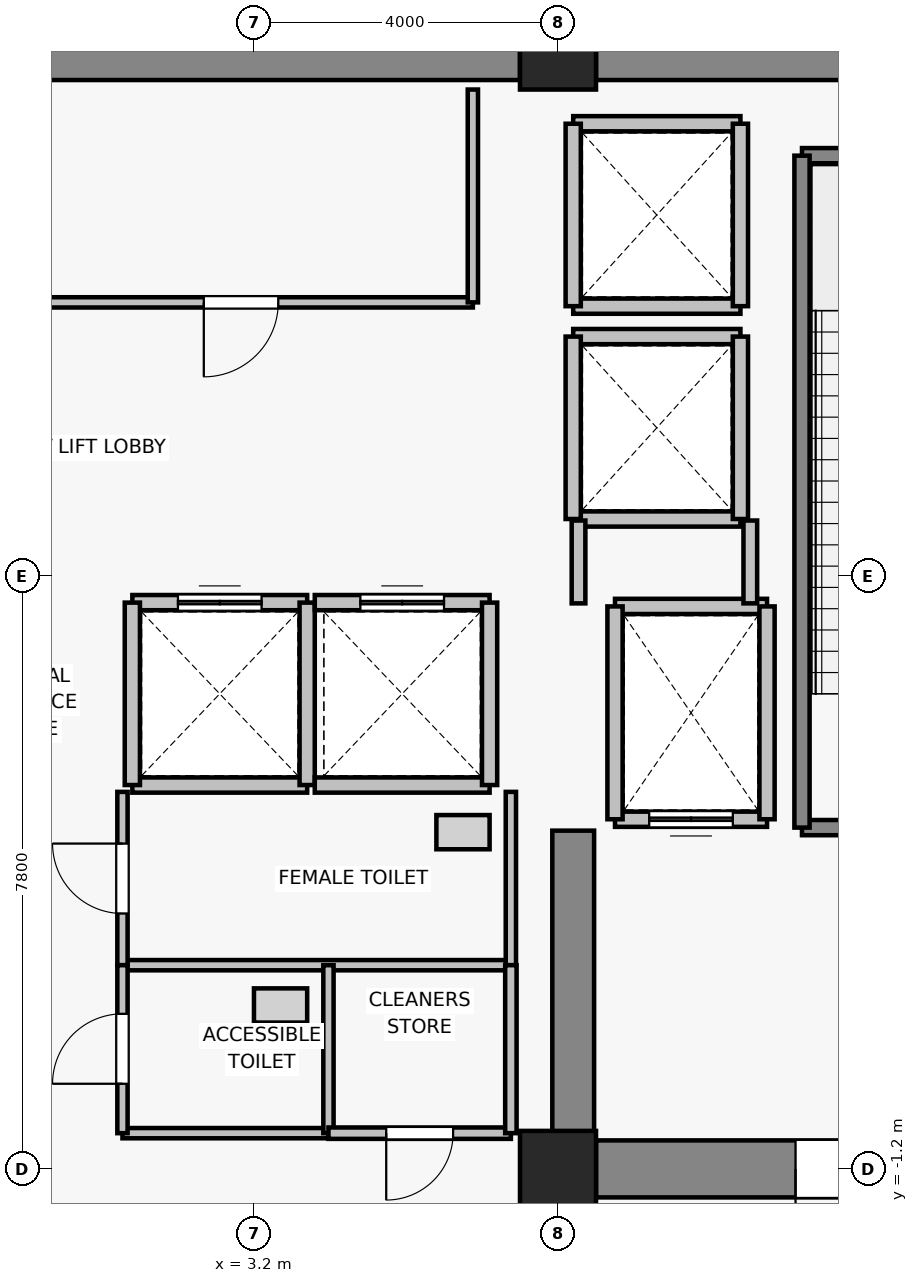
"""IFC4 building model, lengths in metres.
Left out: names, types, materials, properties, quantities, classifications, styles, units other than length and angle.
Written with IfcOpenShell. Run it as: python <this file> out.ifc"""

import sys

from ifc_helpers import new_model, si_unit, direction, frame, frame_2d, origin, origin_2d, place, context, subcontext, project, spatial, rectangle, extrude, source, transform, mapped, element, fill, save


model = new_model("IFC4")
c1 = context("Model", 3, precision=1e-05, world=origin(), true_north=direction((0.0, 1.0)))
c2 = subcontext(c1, "Body", "Model", "MODEL_VIEW")
j1 = project(units=[si_unit("LENGTHUNIT", "METRE"), si_unit("PLANEANGLEUNIT", "RADIAN")], contexts=[c1])
p1 = place(None, origin())
s1 = spatial("IfcSite", under=j1, at=p1, CompositionType="ELEMENT")
p2 = place(p1, origin())
s2 = spatial("IfcBuilding", under=s1, at=p2, CompositionType="ELEMENT")
p3 = place(p2, frame((0.0, 0.0, 139.6)))
s3 = spatial("IfcBuildingStorey", under=s2, at=p3, CompositionType="ELEMENT", Elevation=139.6)
for number, where, z_axis, x_axis in (
    (1, (7.2, -1.2, 0.0), (0.0, 0.0, 1.0), (1.0, 0.0, 0.0)),
    (2, (7.2, 13.5, 0.0), (0.0, 0.0, 1.0), (1.0, 0.0, 0.0)),
):
    element("IfcColumn", number, at=place(p3, frame(where, z_axis=z_axis, x_axis=x_axis)), inside=s3, PredefinedType="COLUMN", context=c2, shape_type="SweptSolid", body=[
        extrude(rectangle(XDim=1.0, YDim=1.0, at=origin_2d()), origin(), (0.0, 0.0, 1.0), 6.6),
    ])
p4 = place(p3, frame((-6.7, 13.5, 0.0), z_axis=(0.0, 0.0, 1.0), x_axis=(1.0, 0.0, 0.0)))
e3 = element("IfcWall", 3, at=p4, inside=s3, PredefinedType="SHEAR", context=c2, shape_type="SweptSolid", body=[
    extrude(rectangle(XDim=13.4, YDim=0.75, at=frame_2d((6.7, 0.0))), origin(), (0.0, 0.0, 1.0), 6.375),
])
p5 = place(p3, frame((7.7, 13.5, 0.0), z_axis=(0.0, 0.0, 1.0), x_axis=(1.0, 0.0, 0.0)))
e4 = element("IfcWall", 4, at=p5, inside=s3, PredefinedType="SHEAR", context=c2, shape_type="SweptSolid", body=[
    extrude(rectangle(XDim=6.2, YDim=0.75, at=frame_2d((3.1, 0.0))), origin(), (0.0, 0.0, 1.0), 6.375),
])
p6 = place(p3, frame((13.9, -1.2, 0.0), z_axis=(0.0, 0.0, 1.0), x_axis=(-1.0, 0.0, 0.0)))
e5 = element("IfcWall", 5, at=p6, inside=s3, PredefinedType="SHEAR", context=c2, shape_type="SweptSolid", body=[
    extrude(rectangle(XDim=6.2, YDim=0.75, at=frame_2d((3.1, 0.0))), origin(), (0.0, 0.0, 1.0), 6.375),
])
p7 = place(p6, frame((2.425, 0.0, 0.0)))
e6 = element("IfcOpeningElement", 6, at=p7, cuts=e5, PredefinedType="OPENING", context=c2, shape_type="SweptSolid", body=[
    extrude(rectangle(XDim=1.15, YDim=2.15, at=frame_2d((0.575, 1.075))), frame((0.0, 0.385, 0.0), z_axis=(0.0, -1.0, 0.0), x_axis=(1.0, 0.0, 0.0)), (0.0, 0.0, 1.0), 0.77),
])
p8 = place(p3, frame((7.4, -0.825, 0.0), z_axis=(0.0, 0.0, 1.0), x_axis=(0.0, 1.0, 0.0)))
e7 = element("IfcWall", 7, at=p8, inside=s3, PredefinedType="SHEAR", context=c2, shape_type="SweptSolid", body=[
    extrude(rectangle(XDim=4.075, YDim=0.55, at=frame_2d((2.038, 0.0))), origin(), (0.0, 0.0, 1.0), 6.375),
])
p9 = place(p3, frame((9.95, 3.4, 0.0), z_axis=(0.0, 0.0, 1.0), x_axis=(-1.0, 0.0, 0.0)))
e8 = element("IfcWall", 8, at=p9, inside=s3, PredefinedType="SOLIDWALL", context=c2, shape_type="SweptSolid", body=[
    extrude(rectangle(XDim=2.0, YDim=0.2, at=frame_2d((1.0, 0.0))), origin(), (0.0, 0.0, 1.0), 6.375),
])
p10 = place(p9, frame((0.45, 0.0, 0.0)))
e9 = element("IfcOpeningElement", 9, at=p10, cuts=e8, PredefinedType="OPENING", context=c2, shape_type="SweptSolid", body=[
    extrude(rectangle(XDim=1.1, YDim=2.2, at=frame_2d((0.55, 1.1))), frame((0.0, 0.11, 0.0), z_axis=(0.0, -1.0, 0.0), x_axis=(1.0, 0.0, 0.0)), (0.0, 0.0, 1.0), 0.22),
])
p11 = place(p3, frame((7.95, 6.2, 0.0), z_axis=(0.0, 0.0, 1.0), x_axis=(1.0, 0.0, 0.0)))
e10 = element("IfcWall", 10, at=p11, inside=s3, PredefinedType="SOLIDWALL", context=c2, shape_type="SweptSolid", body=[
    extrude(rectangle(XDim=2.0, YDim=0.2, at=frame_2d((1.0, 0.0))), origin(), (0.0, 0.0, 1.0), 6.375),
])
for number, where, z_axis, x_axis in (
    (11, (7.95, 3.4, 0.0), (0.0, 0.0, 1.0), (0.0, 1.0, 0.0)),
    (12, (9.95, 6.2, 0.0), (0.0, 0.0, 1.0), (0.0, -1.0, 0.0)),
):
    element("IfcWall", number, at=place(p3, frame(where, z_axis=z_axis, x_axis=x_axis)), inside=s3, PredefinedType="SOLIDWALL", context=c2, shape_type="SweptSolid", body=[
        extrude(rectangle(XDim=2.8, YDim=0.2, at=frame_2d((1.4, 0.0))), origin(), (0.0, 0.0, 1.0), 6.375),
    ])
p12 = place(p3, frame((3.9, 3.85, 0.0), z_axis=(0.0, 0.0, 1.0), x_axis=(-1.0, 0.0, 0.0)))
e13 = element("IfcWall", 13, at=p12, inside=s3, PredefinedType="SOLIDWALL", context=c2, shape_type="SweptSolid", body=[
    extrude(rectangle(XDim=2.3, YDim=0.2, at=frame_2d((1.15, 0.0))), origin(), (0.0, 0.0, 1.0), 6.375),
])
p13 = place(p3, frame((1.6, 6.25, 0.0), z_axis=(0.0, 0.0, 1.0), x_axis=(1.0, 0.0, 0.0)))
e14 = element("IfcWall", 14, at=p13, inside=s3, PredefinedType="SOLIDWALL", context=c2, shape_type="SweptSolid", body=[
    extrude(rectangle(XDim=2.3, YDim=0.2, at=frame_2d((1.15, 0.0))), origin(), (0.0, 0.0, 1.0), 6.375),
])
p14 = place(p13, frame((0.6, 0.0, 0.0)))
e15 = element("IfcOpeningElement", 15, at=p14, cuts=e14, PredefinedType="OPENING", context=c2, shape_type="SweptSolid", body=[
    extrude(rectangle(XDim=1.1, YDim=2.2, at=frame_2d((0.55, 1.1))), frame((0.0, 0.11, 0.0), z_axis=(0.0, -1.0, 0.0), x_axis=(1.0, 0.0, 0.0)), (0.0, 0.0, 1.0), 0.22),
])
for number, where, z_axis, x_axis in (
    (16, (1.6, 3.85, 0.0), (0.0, 0.0, 1.0), (0.0, 1.0, 0.0)),
    (17, (3.9, 6.25, 0.0), (0.0, 0.0, 1.0), (0.0, -1.0, 0.0)),
):
    element("IfcWall", number, at=place(p3, frame(where, z_axis=z_axis, x_axis=x_axis)), inside=s3, PredefinedType="SOLIDWALL", context=c2, shape_type="SweptSolid", body=[
        extrude(rectangle(XDim=2.4, YDim=0.2, at=frame_2d((1.2, 0.0))), origin(), (0.0, 0.0, 1.0), 6.375),
    ])
p15 = place(p3, frame((6.3, 3.85, 0.0), z_axis=(0.0, 0.0, 1.0), x_axis=(-1.0, 0.0, 0.0)))
e18 = element("IfcWall", 18, at=p15, inside=s3, PredefinedType="SOLIDWALL", context=c2, shape_type="SweptSolid", body=[
    extrude(rectangle(XDim=2.3, YDim=0.2, at=frame_2d((1.15, 0.0))), origin(), (0.0, 0.0, 1.0), 6.375),
])
p16 = place(p3, frame((4.0, 6.25, 0.0), z_axis=(0.0, 0.0, 1.0), x_axis=(1.0, 0.0, 0.0)))
e19 = element("IfcWall", 19, at=p16, inside=s3, PredefinedType="SOLIDWALL", context=c2, shape_type="SweptSolid", body=[
    extrude(rectangle(XDim=2.3, YDim=0.2, at=frame_2d((1.15, 0.0))), origin(), (0.0, 0.0, 1.0), 6.375),
])
p17 = place(p16, frame((0.6, 0.0, 0.0)))
e20 = element("IfcOpeningElement", 20, at=p17, cuts=e19, PredefinedType="OPENING", context=c2, shape_type="SweptSolid", body=[
    extrude(rectangle(XDim=1.1, YDim=2.2, at=frame_2d((0.55, 1.1))), frame((0.0, 0.11, 0.0), z_axis=(0.0, -1.0, 0.0), x_axis=(1.0, 0.0, 0.0)), (0.0, 0.0, 1.0), 0.22),
])
p18 = place(p3, frame((6.3, 6.25, 0.0), z_axis=(0.0, 0.0, 1.0), x_axis=(0.0, -1.0, 0.0)))
e21 = element("IfcWall", 21, at=p18, inside=s3, PredefinedType="SOLIDWALL", context=c2, shape_type="SweptSolid", body=[
    extrude(rectangle(XDim=2.4, YDim=0.2, at=frame_2d((1.2, 0.0))), origin(), (0.0, 0.0, 1.0), 6.375),
])
for number, where, z_axis, x_axis in (
    (22, (9.6, 7.35, 0.0), (0.0, 0.0, 1.0), (-1.0, 0.0, 0.0)),
    (23, (7.4, 9.75, 0.0), (0.0, 0.0, 1.0), (1.0, 0.0, 0.0)),
):
    element("IfcWall", number, at=place(p3, frame(where, z_axis=z_axis, x_axis=x_axis)), inside=s3, PredefinedType="SOLIDWALL", context=c2, shape_type="SweptSolid", body=[
        extrude(rectangle(XDim=2.2, YDim=0.2, at=frame_2d((1.1, 0.0))), origin(), (0.0, 0.0, 1.0), 5.865),
    ])
p19 = place(p3, frame((7.4, 7.35, 0.0), z_axis=(0.0, 0.0, 1.0), x_axis=(0.0, 1.0, 0.0)))
e24 = element("IfcWall", 24, at=p19, inside=s3, PredefinedType="SOLIDWALL", context=c2, shape_type="SweptSolid", body=[
    extrude(rectangle(XDim=2.4, YDim=0.2, at=frame_2d((1.2, 0.0))), origin(), (0.0, 0.0, 1.0), 5.865),
])
p20 = place(p3, frame((9.6, 9.75, 0.0), z_axis=(0.0, 0.0, 1.0), x_axis=(0.0, -1.0, 0.0)))
e25 = element("IfcWall", 25, at=p20, inside=s3, PredefinedType="SOLIDWALL", context=c2, shape_type="SweptSolid", body=[
    extrude(rectangle(XDim=2.4, YDim=0.2, at=frame_2d((1.2, 0.0))), origin(), (0.0, 0.0, 1.0), 6.375),
])
for number, where, z_axis, x_axis in (
    (26, (9.6, 10.15, 0.0), (0.0, 0.0, 1.0), (-1.0, 0.0, 0.0)),
    (27, (7.4, 12.55, 0.0), (0.0, 0.0, 1.0), (1.0, 0.0, 0.0)),
):
    element("IfcWall", number, at=place(p3, frame(where, z_axis=z_axis, x_axis=x_axis)), inside=s3, PredefinedType="SOLIDWALL", context=c2, shape_type="SweptSolid", body=[
        extrude(rectangle(XDim=2.2, YDim=0.2, at=frame_2d((1.1, 0.0))), origin(), (0.0, 0.0, 1.0), 5.865),
    ])
p21 = place(p3, frame((7.4, 10.15, 0.0), z_axis=(0.0, 0.0, 1.0), x_axis=(0.0, 1.0, 0.0)))
e28 = element("IfcWall", 28, at=p21, inside=s3, PredefinedType="SOLIDWALL", context=c2, shape_type="SweptSolid", body=[
    extrude(rectangle(XDim=2.4, YDim=0.2, at=frame_2d((1.2, 0.0))), origin(), (0.0, 0.0, 1.0), 5.865),
])
p22 = place(p3, frame((9.6, 12.55, 0.0), z_axis=(0.0, 0.0, 1.0), x_axis=(0.0, -1.0, 0.0)))
e29 = element("IfcWall", 29, at=p22, inside=s3, PredefinedType="SOLIDWALL", context=c2, shape_type="SweptSolid", body=[
    extrude(rectangle(XDim=2.4, YDim=0.2, at=frame_2d((1.2, 0.0))), origin(), (0.0, 0.0, 1.0), 6.375),
])
p23 = place(p3, frame((13.93, 3.29, 0.0), z_axis=(0.0, 0.0, 1.0), x_axis=(-1.0, 0.0, 0.0)))
e30 = element("IfcWall", 30, at=p23, inside=s3, PredefinedType="SOLIDWALL", context=c2, shape_type="SweptSolid", body=[
    extrude(rectangle(XDim=3.52, YDim=0.2, at=frame_2d((1.76, 0.0))), origin(), (0.0, 0.0, 1.0), 6.375),
])
p24 = place(p23, frame((1.205, 0.0, 0.0)))
e31 = element("IfcOpeningElement", 31, at=p24, cuts=e30, PredefinedType="OPENING", context=c2, shape_type="SweptSolid", body=[
    extrude(rectangle(XDim=1.15, YDim=2.15, at=frame_2d((0.575, 1.075))), frame((0.0, 0.11, 0.0), z_axis=(0.0, -1.0, 0.0), x_axis=(1.0, 0.0, 0.0)), (0.0, 0.0, 1.0), 0.22),
])
p25 = place(p3, frame((10.41, 12.13, 0.0), z_axis=(0.0, 0.0, 1.0), x_axis=(1.0, 0.0, 0.0)))
e32 = element("IfcWall", 32, at=p25, inside=s3, PredefinedType="SOLIDWALL", context=c2, shape_type="SweptSolid", body=[
    extrude(rectangle(XDim=3.52, YDim=0.2, at=frame_2d((1.76, 0.0))), origin(), (0.0, 0.0, 1.0), 6.375),
])
p26 = place(p3, frame((10.41, 3.29, 0.0), z_axis=(0.0, 0.0, 1.0), x_axis=(0.0, 1.0, 0.0)))
e33 = element("IfcWall", 33, at=p26, inside=s3, PredefinedType="SOLIDWALL", context=c2, shape_type="SweptSolid", body=[
    extrude(rectangle(XDim=8.84, YDim=0.2, at=frame_2d((4.42, 0.0))), origin(), (0.0, 0.0, 1.0), 6.375),
])
p27 = place(p3, frame((7.47, 6.24, 0.0), z_axis=(0.0, 0.0, 1.0), x_axis=(0.0, 1.0, 0.0)))
e34 = element("IfcWall", 34, at=p27, inside=s3, PredefinedType="PARTITIONING", context=c2, shape_type="SweptSolid", body=[
    extrude(rectangle(XDim=1.09, YDim=0.18, at=frame_2d((0.545, 0.0))), origin(), (0.0, 0.0, 1.0), 5.865),
])
p28 = place(p3, frame((9.73, 7.33, 0.0), z_axis=(0.0, 0.0, 1.0), x_axis=(0.0, -1.0, 0.0)))
e35 = element("IfcWall", 35, at=p28, inside=s3, PredefinedType="PARTITIONING", context=c2, shape_type="SweptSolid", body=[
    extrude(rectangle(XDim=1.09, YDim=0.18, at=frame_2d((0.545, 0.0))), origin(), (0.0, 0.0, 1.0), 6.375),
])
p29 = place(p3, frame((6.08, 10.2, 0.0), z_axis=(0.0, 0.0, 1.0), x_axis=(-1.0, 0.0, 0.0)))
e36 = element("IfcWall", 36, at=p29, inside=s3, PredefinedType="PARTITIONING", context=c2, shape_type="SweptSolid", body=[
    extrude(rectangle(XDim=6.1, YDim=0.135, at=frame_2d((3.05, 0.0))), origin(), (0.0, 0.0, 1.0), 6.375),
])
p30 = place(p29, frame((2.56, 0.0, 0.0)))
e37 = element("IfcOpeningElement", 37, at=p30, cuts=e36, PredefinedType="OPENING", context=c2, shape_type="SweptSolid", body=[
    extrude(rectangle(XDim=0.98, YDim=2.15, at=frame_2d((0.49, 1.075))), frame((0.0, 0.077, 0.0), z_axis=(0.0, -1.0, 0.0), x_axis=(1.0, 0.0, 0.0)), (0.0, 0.0, 1.0), 0.155),
])
p31 = place(p3, frame((6.08, 13.0, 0.0), z_axis=(0.0, 0.0, 1.0), x_axis=(0.0, -1.0, 0.0)))
e38 = element("IfcWall", 38, at=p31, inside=s3, PredefinedType="PARTITIONING", context=c2, shape_type="SweptSolid", body=[
    extrude(rectangle(XDim=2.8, YDim=0.135, at=frame_2d((1.4, 0.0))), origin(), (0.0, 0.0, 1.0), 6.375),
])
p32 = place(p3, frame((6.58, 1.48, 0.0), z_axis=(0.0, 0.0, 1.0), x_axis=(-1.0, 0.0, 0.0)))
e39 = element("IfcWall", 39, at=p32, inside=s3, PredefinedType="PARTITIONING", context=c2, shape_type="SweptSolid", body=[
    extrude(rectangle(XDim=5.11, YDim=0.135, at=frame_2d((2.555, 0.0))), origin(), (0.0, 0.0, 1.0), 6.375),
])
p33 = place(p3, frame((1.47, 1.48, 0.0), z_axis=(0.0, 0.0, 1.0), x_axis=(0.0, 1.0, 0.0)))
e40 = element("IfcWall", 40, at=p33, inside=s3, PredefinedType="PARTITIONING", context=c2, shape_type="SweptSolid", body=[
    extrude(rectangle(XDim=2.28, YDim=0.135, at=frame_2d((1.14, 0.0))), origin(), (0.0, 0.0, 1.0), 6.375),
])
p34 = place(p33, frame((0.68, 0.0, 0.0)))
e41 = element("IfcOpeningElement", 41, at=p34, cuts=e40, PredefinedType="OPENING", context=c2, shape_type="SweptSolid", body=[
    extrude(rectangle(XDim=0.92, YDim=2.1, at=frame_2d((0.46, 1.05))), frame((0.0, 0.077, 0.0), z_axis=(0.0, -1.0, 0.0), x_axis=(1.0, 0.0, 0.0)), (0.0, 0.0, 1.0), 0.155),
])
p35 = place(p3, frame((6.58, 3.76, 0.0), z_axis=(0.0, 0.0, 1.0), x_axis=(0.0, -1.0, 0.0)))
e42 = element("IfcWall", 42, at=p35, inside=s3, PredefinedType="PARTITIONING", context=c2, shape_type="SweptSolid", body=[
    extrude(rectangle(XDim=2.28, YDim=0.135, at=frame_2d((1.14, 0.0))), origin(), (0.0, 0.0, 1.0), 6.375),
])
p36 = place(p3, frame((4.18, -0.73, 0.0), z_axis=(0.0, 0.0, 1.0), x_axis=(-1.0, 0.0, 0.0)))
e43 = element("IfcWall", 43, at=p36, inside=s3, PredefinedType="PARTITIONING", context=c2, shape_type="SweptSolid", body=[
    extrude(rectangle(XDim=2.71, YDim=0.135, at=frame_2d((1.355, 0.0))), origin(), (0.0, 0.0, 1.0), 6.375),
])
p37 = place(p3, frame((1.47, -0.73, 0.0), z_axis=(0.0, 0.0, 1.0), x_axis=(0.0, 1.0, 0.0)))
e44 = element("IfcWall", 44, at=p37, inside=s3, PredefinedType="PARTITIONING", context=c2, shape_type="SweptSolid", body=[
    extrude(rectangle(XDim=2.21, YDim=0.135, at=frame_2d((1.105, 0.0))), origin(), (0.0, 0.0, 1.0), 6.375),
])
p38 = place(p37, frame((0.65, 0.0, 0.0)))
e45 = element("IfcOpeningElement", 45, at=p38, cuts=e44, PredefinedType="OPENING", context=c2, shape_type="SweptSolid", body=[
    extrude(rectangle(XDim=0.92, YDim=2.1, at=frame_2d((0.46, 1.05))), frame((0.0, 0.077, 0.0), z_axis=(0.0, -1.0, 0.0), x_axis=(1.0, 0.0, 0.0)), (0.0, 0.0, 1.0), 0.155),
])
p39 = place(p3, frame((4.18, 1.48, 0.0), z_axis=(0.0, 0.0, 1.0), x_axis=(0.0, -1.0, 0.0)))
e46 = element("IfcWall", 46, at=p39, inside=s3, PredefinedType="PARTITIONING", context=c2, shape_type="SweptSolid", body=[
    extrude(rectangle(XDim=2.21, YDim=0.135, at=frame_2d((1.105, 0.0))), origin(), (0.0, 0.0, 1.0), 6.375),
])
p40 = place(p3, frame((6.58, -0.73, 0.0), z_axis=(0.0, 0.0, 1.0), x_axis=(-1.0, 0.0, 0.0)))
e47 = element("IfcWall", 47, at=p40, inside=s3, PredefinedType="PARTITIONING", context=c2, shape_type="SweptSolid", body=[
    extrude(rectangle(XDim=2.4, YDim=0.15, at=frame_2d((1.2, 0.0))), origin(), (0.0, 0.0, 1.0), 6.375),
])
p41 = place(p40, frame((0.76, 0.0, 0.0)))
e48 = element("IfcOpeningElement", 48, at=p41, cuts=e47, PredefinedType="OPENING", context=c2, shape_type="SweptSolid", body=[
    extrude(rectangle(XDim=0.88, YDim=2.1, at=frame_2d((0.44, 1.05))), frame((0.0, 0.085, 0.0), z_axis=(0.0, -1.0, 0.0), x_axis=(1.0, 0.0, 0.0)), (0.0, 0.0, 1.0), 0.17),
])
p42 = place(p3, frame((6.58, 1.48, 0.0), z_axis=(0.0, 0.0, 1.0), x_axis=(0.0, -1.0, 0.0)))
e49 = element("IfcWall", 49, at=p42, inside=s3, PredefinedType="PARTITIONING", context=c2, shape_type="SweptSolid", body=[
    extrude(rectangle(XDim=2.21, YDim=0.15, at=frame_2d((1.105, 0.0))), origin(), (0.0, 0.0, 1.0), 6.375),
])
m1 = source(origin(), c2, "Body", "SweptSolid", [
    extrude(rectangle(XDim=1.1, YDim=2.2, at=frame_2d((0.55, 1.1))), frame((0.0, 0.025, 0.0), z_axis=(0.0, -1.0, 0.0), x_axis=(1.0, 0.0, 0.0)), (0.0, 0.0, 1.0), 0.05),
])
p43 = place(p10, origin())
e50 = element("IfcDoor", 50, at=p43, inside=s3, OperationType="DOUBLE_DOOR_SLIDING", PredefinedType="DOOR", context=c2, shape_type="MappedRepresentation", body=[
    mapped(m1, transform((0.0, 0.0, 0.0), x_axis=(1.0, 0.0, 0.0), y_axis=(0.0, 1.0, 0.0), z_axis=(0.0, 0.0, 1.0), scale=1.0)),
])
fill(e9, e50)
p44 = place(p14, origin())
e51 = element("IfcDoor", 51, at=p44, inside=s3, OperationType="DOUBLE_DOOR_SLIDING", PredefinedType="DOOR", context=c2, shape_type="MappedRepresentation", body=[
    mapped(m1, transform((0.0, 0.0, 0.0), x_axis=(1.0, 0.0, 0.0), y_axis=(0.0, 1.0, 0.0), z_axis=(0.0, 0.0, 1.0), scale=1.0)),
])
fill(e15, e51)
p45 = place(p17, origin())
e52 = element("IfcDoor", 52, at=p45, inside=s3, OperationType="DOUBLE_DOOR_SLIDING", PredefinedType="DOOR", context=c2, shape_type="MappedRepresentation", body=[
    mapped(m1, transform((0.0, 0.0, 0.0), x_axis=(1.0, 0.0, 0.0), y_axis=(0.0, 1.0, 0.0), z_axis=(0.0, 0.0, 1.0), scale=1.0)),
])
fill(e20, e52)
m2 = source(origin(), c2, "Body", "SweptSolid", [
    extrude(rectangle(XDim=1.15, YDim=2.15, at=frame_2d((0.575, 1.075))), frame((0.0, 0.025, 0.0), z_axis=(0.0, -1.0, 0.0), x_axis=(1.0, 0.0, 0.0)), (0.0, 0.0, 1.0), 0.05),
])
p46 = place(p7, origin())
e53 = element("IfcDoor", 53, at=p46, inside=s3, OperationType="SINGLE_SWING_RIGHT", PredefinedType="DOOR", context=c2, shape_type="MappedRepresentation", body=[
    mapped(m2, transform((0.0, 0.0, 0.0), x_axis=(1.0, 0.0, 0.0), y_axis=(0.0, 1.0, 0.0), z_axis=(0.0, 0.0, 1.0), scale=1.0)),
])
fill(e6, e53)
m3 = source(origin(), c2, "Body", "SweptSolid", [
    extrude(rectangle(XDim=0.98, YDim=2.15, at=frame_2d((0.49, 1.075))), frame((0.0, 0.025, 0.0), z_axis=(0.0, -1.0, 0.0), x_axis=(1.0, 0.0, 0.0)), (0.0, 0.0, 1.0), 0.05),
])
p47 = place(p30, origin())
e54 = element("IfcDoor", 54, at=p47, inside=s3, OperationType="SINGLE_SWING_RIGHT", PredefinedType="DOOR", context=c2, shape_type="MappedRepresentation", body=[
    mapped(m3, transform((0.0, 0.0, 0.0), x_axis=(1.0, 0.0, 0.0), y_axis=(0.0, 1.0, 0.0), z_axis=(0.0, 0.0, 1.0), scale=1.0)),
])
fill(e37, e54)
m4 = source(origin(), c2, "Body", "SweptSolid", [
    extrude(rectangle(XDim=0.92, YDim=2.1, at=frame_2d((0.46, 1.05))), frame((0.0, 0.025, 0.0), z_axis=(0.0, -1.0, 0.0), x_axis=(1.0, 0.0, 0.0)), (0.0, 0.0, 1.0), 0.05),
])
p48 = place(p34, origin())
e55 = element("IfcDoor", 55, at=p48, inside=s3, OperationType="SINGLE_SWING_RIGHT", PredefinedType="DOOR", context=c2, shape_type="MappedRepresentation", body=[
    mapped(m4, transform((0.0, 0.0, 0.0), x_axis=(1.0, 0.0, 0.0), y_axis=(0.0, 1.0, 0.0), z_axis=(0.0, 0.0, 1.0), scale=1.0)),
])
fill(e41, e55)
p49 = place(p38, origin())
e56 = element("IfcDoor", 56, at=p49, inside=s3, OperationType="SINGLE_SWING_LEFT", PredefinedType="DOOR", context=c2, shape_type="MappedRepresentation", body=[
    mapped(m4, transform((0.0, 0.0, 0.0), x_axis=(1.0, 0.0, 0.0), y_axis=(0.0, 1.0, 0.0), z_axis=(0.0, 0.0, 1.0), scale=1.0)),
])
fill(e45, e56)
m5 = source(origin(), c2, "Body", "SweptSolid", [
    extrude(rectangle(XDim=0.88, YDim=2.1, at=frame_2d((0.44, 1.05))), frame((0.0, 0.025, 0.0), z_axis=(0.0, -1.0, 0.0), x_axis=(1.0, 0.0, 0.0)), (0.0, 0.0, 1.0), 0.05),
])
p50 = place(p41, origin())
e57 = element("IfcDoor", 57, at=p50, inside=s3, OperationType="SINGLE_SWING_RIGHT", PredefinedType="DOOR", context=c2, shape_type="MappedRepresentation", body=[
    mapped(m5, transform((0.0, 0.0, 0.0), x_axis=(1.0, 0.0, 0.0), y_axis=(0.0, 1.0, 0.0), z_axis=(0.0, 0.0, 1.0), scale=1.0)),
])
fill(e48, e57)
save(model, sys.argv[1])
